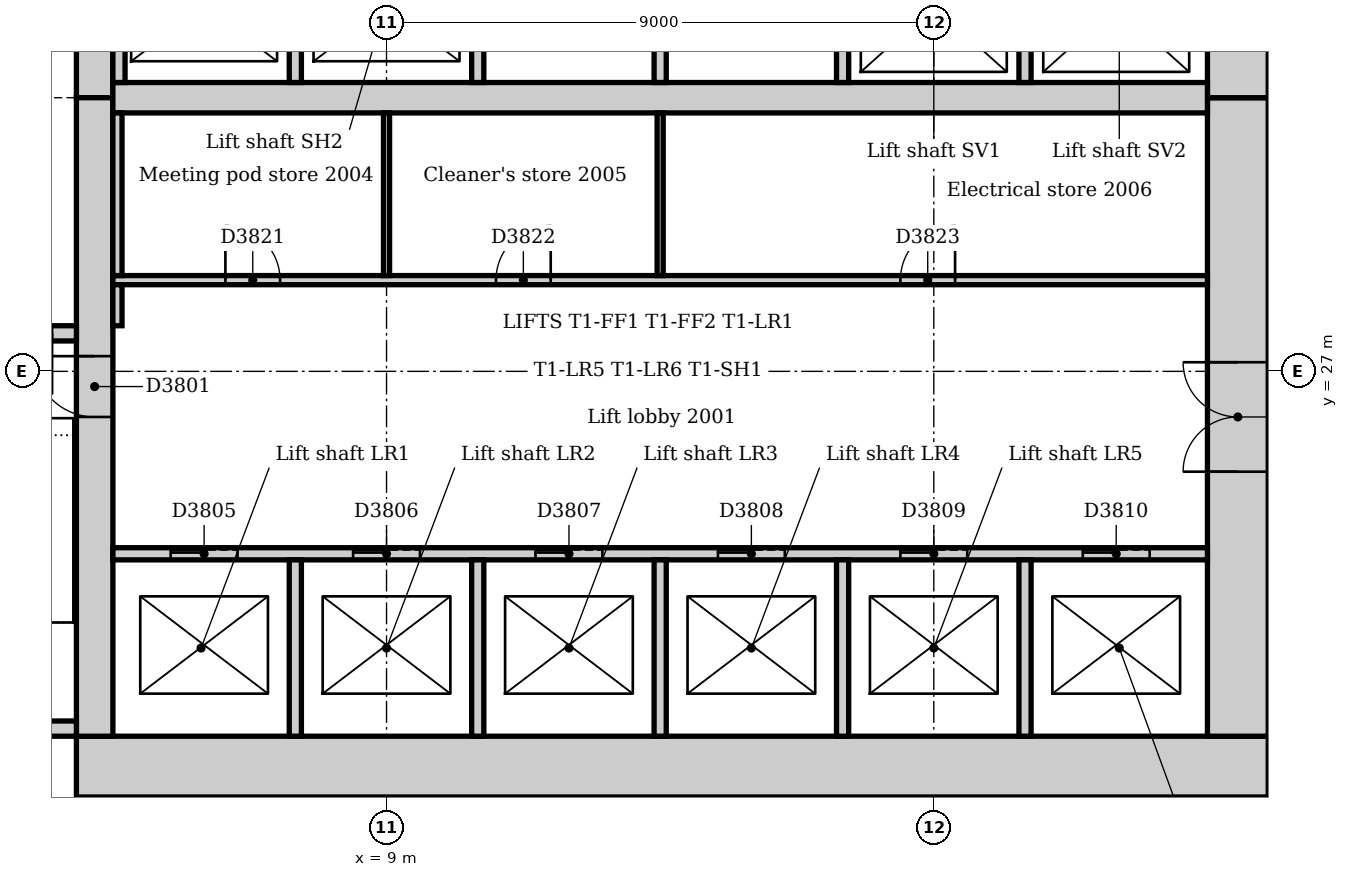
"""IFC4 building model, lengths in metres.
Left out: names, types, materials, properties, quantities, classifications, styles, units other than length and angle.
Written with IfcOpenShell. Run it as: python <this file> out.ifc"""

import sys

from ifc_helpers import new_model, si_unit, direction, frame, frame_2d, origin, place, context, subcontext, project, spatial, rectangle, extrude, element, fill, save


model = new_model("IFC4")
c1 = context("Model", 3, precision=1e-05, world=origin(), true_north=direction((0.0, 1.0)))
c2 = subcontext(c1, "Body", "Model", "MODEL_VIEW")
j1 = project(units=[si_unit("LENGTHUNIT", "METRE"), si_unit("PLANEANGLEUNIT", "RADIAN")], contexts=[c1])
p1 = place(None, origin())
s1 = spatial("IfcSite", under=j1, at=p1, CompositionType="ELEMENT")
p2 = place(p1, origin())
s2 = spatial("IfcBuilding", under=s1, at=p2, CompositionType="ELEMENT")
p3 = place(p2, frame((0.0, 0.0, 87.0)))
s3 = spatial("IfcBuildingStorey", under=s2, at=p3, CompositionType="ELEMENT", Elevation=87.0)
p4 = place(p3, frame((3.9, 20.5, 0.0), z_axis=(0.0, 0.0, 1.0), x_axis=(1.0, 0.0, 0.0)))
e1 = element("IfcWall", 1, at=p4, inside=s3, PredefinedType="SOLIDWALL", context=c2, shape_type="SweptSolid", body=[
    extrude(rectangle(XDim=19.6, YDim=1.0, at=frame_2d((9.8, 0.0))), origin(), (0.0, 0.0, 1.0), 4.0),
])
p5 = place(p3, frame((23.0, 21.0, 0.0), z_axis=(0.0, 0.0, 1.0), x_axis=(0.0, 1.0, 0.0)))
e2 = element("IfcWall", 2, at=p5, inside=s3, PredefinedType="SOLIDWALL", context=c2, shape_type="SweptSolid", body=[
    extrude(rectangle(XDim=10.5, YDim=1.0, at=frame_2d((5.25, 0.0))), origin(), (0.0, 0.0, 1.0), 4.0),
])
p6 = place(p5, frame((4.35, 0.0, 0.0)))
e3 = element("IfcOpeningElement", 3, at=p6, cuts=e2, PredefinedType="OPENING", context=c2, shape_type="SweptSolid", body=[
    extrude(rectangle(XDim=1.8, YDim=2.1, at=frame_2d((0.9, 1.05))), frame((0.0, 0.51, 0.0), z_axis=(0.0, -1.0, 0.0), x_axis=(1.0, 0.0, 0.0)), (0.0, 0.0, 1.0), 1.02),
])
p7 = place(p3, frame((23.0, 31.5, 0.0), z_axis=(0.0, 0.0, 1.0), x_axis=(0.0, 1.0, 0.0)))
e4 = element("IfcWall", 4, at=p7, inside=s3, PredefinedType="SOLIDWALL", context=c2, shape_type="SweptSolid", body=[
    extrude(rectangle(XDim=10.5, YDim=1.0, at=frame_2d((5.25, 0.0))), origin(), (0.0, 0.0, 1.0), 4.0),
])
p8 = place(p7, frame((3.15, 0.0, 0.0)))
e5 = element("IfcOpeningElement", 5, at=p8, cuts=e4, PredefinedType="OPENING", context=c2, shape_type="SweptSolid", body=[
    extrude(rectangle(XDim=1.0, YDim=2.1, at=frame_2d((0.5, 1.05))), frame((0.0, 0.51, 0.0), z_axis=(0.0, -1.0, 0.0), x_axis=(1.0, 0.0, 0.0)), (0.0, 0.0, 1.0), 1.02),
])
p9 = place(p7, frame((5.2, 0.0, 0.0)))
e6 = element("IfcOpeningElement", 6, at=p9, cuts=e4, PredefinedType="OPENING", context=c2, shape_type="SweptSolid", body=[
    extrude(rectangle(XDim=1.0, YDim=2.1, at=frame_2d((0.5, 1.05))), frame((0.0, 0.51, 0.0), z_axis=(0.0, -1.0, 0.0), x_axis=(1.0, 0.0, 0.0)), (0.0, 0.0, 1.0), 1.02),
])
p10 = place(p3, frame((4.2, 42.0, 0.0), z_axis=(0.0, 0.0, 1.0), x_axis=(0.0, -1.0, 0.0)))
e7 = element("IfcWall", 7, at=p10, inside=s3, PredefinedType="SOLIDWALL", context=c2, shape_type="SweptSolid", body=[
    extrude(rectangle(XDim=10.5, YDim=0.6, at=frame_2d((5.25, 0.0))), origin(), (0.0, 0.0, 1.0), 4.0),
])
p11 = place(p10, frame((5.3, 0.0, 0.0)))
e8 = element("IfcOpeningElement", 8, at=p11, cuts=e7, PredefinedType="OPENING", context=c2, shape_type="SweptSolid", body=[
    extrude(rectangle(XDim=1.0, YDim=2.1, at=frame_2d((0.5, 1.05))), frame((0.0, 0.31, 0.0), z_axis=(0.0, -1.0, 0.0), x_axis=(1.0, 0.0, 0.0)), (0.0, 0.0, 1.0), 0.62),
])
p12 = place(p3, frame((4.2, 31.5, 0.0), z_axis=(0.0, 0.0, 1.0), x_axis=(0.0, -1.0, 0.0)))
e9 = element("IfcWall", 9, at=p12, inside=s3, PredefinedType="SOLIDWALL", context=c2, shape_type="SweptSolid", body=[
    extrude(rectangle(XDim=10.5, YDim=0.6, at=frame_2d((5.25, 0.0))), origin(), (0.0, 0.0, 1.0), 4.0),
])
p13 = place(p12, frame((4.25, 0.0, 0.0)))
e10 = element("IfcOpeningElement", 10, at=p13, cuts=e9, PredefinedType="OPENING", context=c2, shape_type="SweptSolid", body=[
    extrude(rectangle(XDim=1.0, YDim=2.1, at=frame_2d((0.5, 1.05))), frame((0.0, 0.31, 0.0), z_axis=(0.0, -1.0, 0.0), x_axis=(1.0, 0.0, 0.0)), (0.0, 0.0, 1.0), 0.62),
])
p14 = place(p3, frame((4.5, 31.5, 0.0), z_axis=(0.0, 0.0, 1.0), x_axis=(1.0, 0.0, 0.0)))
e11 = element("IfcWall", 11, at=p14, inside=s3, PredefinedType="SOLIDWALL", context=c2, shape_type="SweptSolid", body=[
    extrude(rectangle(XDim=18.0, YDim=0.5, at=frame_2d((9.0, 0.0))), origin(), (0.0, 0.0, 1.0), 4.0),
])
p15 = place(p3, frame((0.36, 21.125, 0.0), z_axis=(0.0, 0.0, 1.0), x_axis=(1.0, 0.0, 0.0)))
e12 = element("IfcWall", 12, at=p15, inside=s3, PredefinedType="SOLIDWALL", context=c2, shape_type="SweptSolid", body=[
    extrude(rectangle(XDim=3.54, YDim=0.25, at=frame_2d((1.77, 0.0))), origin(), (0.0, 0.0, 1.0), 4.0),
])
p16 = place(p3, frame((3.9, 27.625, 0.0), z_axis=(0.0, 0.0, 1.0), x_axis=(-1.0, 0.0, 0.0)))
e13 = element("IfcWall", 13, at=p16, inside=s3, PredefinedType="SOLIDWALL", context=c2, shape_type="SweptSolid", body=[
    extrude(rectangle(XDim=3.54, YDim=0.25, at=frame_2d((1.77, 0.0))), origin(), (0.0, 0.0, 1.0), 4.0),
])
p17 = place(p16, frame((0.4, 0.0, 0.0)))
e14 = element("IfcOpeningElement", 14, at=p17, cuts=e13, PredefinedType="OPENING", context=c2, shape_type="SweptSolid", body=[
    extrude(rectangle(XDim=1.0, YDim=2.1, at=frame_2d((0.5, 1.05))), frame((0.0, 0.135, 0.0), z_axis=(0.0, -1.0, 0.0), x_axis=(1.0, 0.0, 0.0)), (0.0, 0.0, 1.0), 0.27),
])
p18 = place(p3, frame((4.5, 24.0, 0.0), z_axis=(0.0, 0.0, 1.0), x_axis=(1.0, 0.0, 0.0)))
e15 = element("IfcWall", 15, at=p18, inside=s3, PredefinedType="PARTITIONING", context=c2, shape_type="SweptSolid", body=[
    extrude(rectangle(XDim=18.0, YDim=0.2, at=frame_2d((9.0, 0.0))), origin(), (0.0, 0.0, 1.0), 3.85),
])
p19 = place(p18, frame((0.95, 0.0, 0.0)))
e16 = element("IfcOpeningElement", 16, at=p19, cuts=e15, PredefinedType="OPENING", context=c2, shape_type="SweptSolid", body=[
    extrude(rectangle(XDim=1.1, YDim=2.1, at=frame_2d((0.55, 1.05))), frame((0.0, 0.11, 0.0), z_axis=(0.0, -1.0, 0.0), x_axis=(1.0, 0.0, 0.0)), (0.0, 0.0, 1.0), 0.22),
])
p20 = place(p18, frame((3.95, 0.0, 0.0)))
e17 = element("IfcOpeningElement", 17, at=p20, cuts=e15, PredefinedType="OPENING", context=c2, shape_type="SweptSolid", body=[
    extrude(rectangle(XDim=1.1, YDim=2.1, at=frame_2d((0.55, 1.05))), frame((0.0, 0.11, 0.0), z_axis=(0.0, -1.0, 0.0), x_axis=(1.0, 0.0, 0.0)), (0.0, 0.0, 1.0), 0.22),
])
p21 = place(p18, frame((6.95, 0.0, 0.0)))
e18 = element("IfcOpeningElement", 18, at=p21, cuts=e15, PredefinedType="OPENING", context=c2, shape_type="SweptSolid", body=[
    extrude(rectangle(XDim=1.1, YDim=2.1, at=frame_2d((0.55, 1.05))), frame((0.0, 0.11, 0.0), z_axis=(0.0, -1.0, 0.0), x_axis=(1.0, 0.0, 0.0)), (0.0, 0.0, 1.0), 0.22),
])
p22 = place(p18, frame((9.95, 0.0, 0.0)))
e19 = element("IfcOpeningElement", 19, at=p22, cuts=e15, PredefinedType="OPENING", context=c2, shape_type="SweptSolid", body=[
    extrude(rectangle(XDim=1.1, YDim=2.1, at=frame_2d((0.55, 1.05))), frame((0.0, 0.11, 0.0), z_axis=(0.0, -1.0, 0.0), x_axis=(1.0, 0.0, 0.0)), (0.0, 0.0, 1.0), 0.22),
])
p23 = place(p18, frame((12.95, 0.0, 0.0)))
e20 = element("IfcOpeningElement", 20, at=p23, cuts=e15, PredefinedType="OPENING", context=c2, shape_type="SweptSolid", body=[
    extrude(rectangle(XDim=1.1, YDim=2.1, at=frame_2d((0.55, 1.05))), frame((0.0, 0.11, 0.0), z_axis=(0.0, -1.0, 0.0), x_axis=(1.0, 0.0, 0.0)), (0.0, 0.0, 1.0), 0.22),
])
p24 = place(p18, frame((15.95, 0.0, 0.0)))
e21 = element("IfcOpeningElement", 21, at=p24, cuts=e15, PredefinedType="OPENING", context=c2, shape_type="SweptSolid", body=[
    extrude(rectangle(XDim=1.1, YDim=2.1, at=frame_2d((0.55, 1.05))), frame((0.0, 0.11, 0.0), z_axis=(0.0, -1.0, 0.0), x_axis=(1.0, 0.0, 0.0)), (0.0, 0.0, 1.0), 0.22),
])
p25 = place(p3, frame((4.6, 31.75, 0.0), z_axis=(0.0, 0.0, 1.0), x_axis=(0.0, 1.0, 0.0)))
e22 = element("IfcWall", 22, at=p25, inside=s3, PredefinedType="PARTITIONING", context=c2, shape_type="SweptSolid", body=[
    extrude(rectangle(XDim=2.65, YDim=0.2, at=frame_2d((1.325, 0.0))), origin(), (0.0, 0.0, 1.0), 3.85),
])
p26 = place(p3, frame((7.5, 21.0, 0.0), z_axis=(0.0, 0.0, 1.0), x_axis=(0.0, 1.0, 0.0)))
e23 = element("IfcWall", 23, at=p26, inside=s3, PredefinedType="PARTITIONING", context=c2, shape_type="SweptSolid", body=[
    extrude(rectangle(XDim=2.9, YDim=0.2, at=frame_2d((1.45, 0.0))), origin(), (0.0, 0.0, 1.0), 3.85),
])
p27 = place(p3, frame((7.5, 31.75, 0.0), z_axis=(0.0, 0.0, 1.0), x_axis=(0.0, 1.0, 0.0)))
e24 = element("IfcWall", 24, at=p27, inside=s3, PredefinedType="PARTITIONING", context=c2, shape_type="SweptSolid", body=[
    extrude(rectangle(XDim=2.65, YDim=0.2, at=frame_2d((1.325, 0.0))), origin(), (0.0, 0.0, 1.0), 3.85),
])
p28 = place(p3, frame((10.5, 21.0, 0.0), z_axis=(0.0, 0.0, 1.0), x_axis=(0.0, 1.0, 0.0)))
e25 = element("IfcWall", 25, at=p28, inside=s3, PredefinedType="PARTITIONING", context=c2, shape_type="SweptSolid", body=[
    extrude(rectangle(XDim=2.9, YDim=0.2, at=frame_2d((1.45, 0.0))), origin(), (0.0, 0.0, 1.0), 3.85),
])
p29 = place(p3, frame((10.5, 31.75, 0.0), z_axis=(0.0, 0.0, 1.0), x_axis=(0.0, 1.0, 0.0)))
e26 = element("IfcWall", 26, at=p29, inside=s3, PredefinedType="PARTITIONING", context=c2, shape_type="SweptSolid", body=[
    extrude(rectangle(XDim=2.65, YDim=0.2, at=frame_2d((1.325, 0.0))), origin(), (0.0, 0.0, 1.0), 3.85),
])
p30 = place(p3, frame((13.5, 21.0, 0.0), z_axis=(0.0, 0.0, 1.0), x_axis=(0.0, 1.0, 0.0)))
e27 = element("IfcWall", 27, at=p30, inside=s3, PredefinedType="PARTITIONING", context=c2, shape_type="SweptSolid", body=[
    extrude(rectangle(XDim=2.9, YDim=0.2, at=frame_2d((1.45, 0.0))), origin(), (0.0, 0.0, 1.0), 3.85),
])
p31 = place(p3, frame((13.5, 31.75, 0.0), z_axis=(0.0, 0.0, 1.0), x_axis=(0.0, 1.0, 0.0)))
e28 = element("IfcWall", 28, at=p31, inside=s3, PredefinedType="PARTITIONING", context=c2, shape_type="SweptSolid", body=[
    extrude(rectangle(XDim=2.65, YDim=0.2, at=frame_2d((1.325, 0.0))), origin(), (0.0, 0.0, 1.0), 3.85),
])
p32 = place(p3, frame((16.5, 21.0, 0.0), z_axis=(0.0, 0.0, 1.0), x_axis=(0.0, 1.0, 0.0)))
e29 = element("IfcWall", 29, at=p32, inside=s3, PredefinedType="PARTITIONING", context=c2, shape_type="SweptSolid", body=[
    extrude(rectangle(XDim=2.9, YDim=0.2, at=frame_2d((1.45, 0.0))), origin(), (0.0, 0.0, 1.0), 3.85),
])
p33 = place(p3, frame((16.5, 31.75, 0.0), z_axis=(0.0, 0.0, 1.0), x_axis=(0.0, 1.0, 0.0)))
e30 = element("IfcWall", 30, at=p33, inside=s3, PredefinedType="PARTITIONING", context=c2, shape_type="SweptSolid", body=[
    extrude(rectangle(XDim=2.65, YDim=0.2, at=frame_2d((1.325, 0.0))), origin(), (0.0, 0.0, 1.0), 3.85),
])
p34 = place(p3, frame((19.5, 21.0, 0.0), z_axis=(0.0, 0.0, 1.0), x_axis=(0.0, 1.0, 0.0)))
e31 = element("IfcWall", 31, at=p34, inside=s3, PredefinedType="PARTITIONING", context=c2, shape_type="SweptSolid", body=[
    extrude(rectangle(XDim=2.9, YDim=0.2, at=frame_2d((1.45, 0.0))), origin(), (0.0, 0.0, 1.0), 3.85),
])
p35 = place(p3, frame((19.5, 31.75, 0.0), z_axis=(0.0, 0.0, 1.0), x_axis=(0.0, 1.0, 0.0)))
e32 = element("IfcWall", 32, at=p35, inside=s3, PredefinedType="PARTITIONING", context=c2, shape_type="SweptSolid", body=[
    extrude(rectangle(XDim=2.65, YDim=0.2, at=frame_2d((1.325, 0.0))), origin(), (0.0, 0.0, 1.0), 3.85),
])
p36 = place(p3, frame((4.5, 28.5, 0.0), z_axis=(0.0, 0.0, 1.0), x_axis=(1.0, 0.0, 0.0)))
e33 = element("IfcWall", 33, at=p36, inside=s3, PredefinedType="PARTITIONING", context=c2, shape_type="SweptSolid", body=[
    extrude(rectangle(XDim=18.0, YDim=0.15, at=frame_2d((9.0, 0.0))), origin(), (0.0, 0.0, 1.0), 3.85),
])
p37 = place(p36, frame((1.85, 0.0, 0.0)))
e34 = element("IfcOpeningElement", 34, at=p37, cuts=e33, PredefinedType="OPENING", context=c2, shape_type="SweptSolid", body=[
    extrude(rectangle(XDim=0.9, YDim=2.1, at=frame_2d((0.45, 1.05))), frame((0.0, 0.085, 0.0), z_axis=(0.0, -1.0, 0.0), x_axis=(1.0, 0.0, 0.0)), (0.0, 0.0, 1.0), 0.17),
])
p38 = place(p36, frame((6.3, 0.0, 0.0)))
e35 = element("IfcOpeningElement", 35, at=p38, cuts=e33, PredefinedType="OPENING", context=c2, shape_type="SweptSolid", body=[
    extrude(rectangle(XDim=0.9, YDim=2.1, at=frame_2d((0.45, 1.05))), frame((0.0, 0.085, 0.0), z_axis=(0.0, -1.0, 0.0), x_axis=(1.0, 0.0, 0.0)), (0.0, 0.0, 1.0), 0.17),
])
p39 = place(p36, frame((12.95, 0.0, 0.0)))
e36 = element("IfcOpeningElement", 36, at=p39, cuts=e33, PredefinedType="OPENING", context=c2, shape_type="SweptSolid", body=[
    extrude(rectangle(XDim=0.9, YDim=2.1, at=frame_2d((0.45, 1.05))), frame((0.0, 0.085, 0.0), z_axis=(0.0, -1.0, 0.0), x_axis=(1.0, 0.0, 0.0)), (0.0, 0.0, 1.0), 0.17),
])
p40 = place(p3, frame((4.575, 27.75, 0.0), z_axis=(0.0, 0.0, 1.0), x_axis=(0.0, 1.0, 0.0)))
e37 = element("IfcWall", 37, at=p40, inside=s3, PredefinedType="PARTITIONING", context=c2, shape_type="SweptSolid", body=[
    extrude(rectangle(XDim=0.675, YDim=0.15, at=frame_2d((0.338, 0.0))), origin(), (0.0, 0.0, 1.0), 3.85),
])
p41 = place(p3, frame((4.575, 28.575, 0.0), z_axis=(0.0, 0.0, 1.0), x_axis=(0.0, 1.0, 0.0)))
e38 = element("IfcWall", 38, at=p41, inside=s3, PredefinedType="PARTITIONING", context=c2, shape_type="SweptSolid", body=[
    extrude(rectangle(XDim=2.675, YDim=0.15, at=frame_2d((1.337, 0.0))), origin(), (0.0, 0.0, 1.0), 3.85),
])
for number, where, z_axis, x_axis in (
    (39, (9.0, 28.575, 0.0), (0.0, 0.0, 1.0), (0.0, 1.0, 0.0)),
    (40, (13.5, 28.575, 0.0), (0.0, 0.0, 1.0), (0.0, 1.0, 0.0)),
):
    element("IfcWall", number, at=place(p3, frame(where, z_axis=z_axis, x_axis=x_axis)), inside=s3, PredefinedType="PARTITIONING", context=c2, shape_type="SweptSolid", body=[
        extrude(rectangle(XDim=2.675, YDim=0.1, at=frame_2d((1.337, 0.0))), origin(), (0.0, 0.0, 1.0), 3.85),
    ])
p42 = place(p13, frame((1.0, 0.0, 0.0), z_axis=(0.0, 0.0, 1.0), x_axis=(-1.0, 0.0, 0.0)))
e41 = element("IfcDoor", 41, at=p42, inside=s3, OperationType="SINGLE_SWING_RIGHT", PredefinedType="DOOR", context=c2, shape_type="SweptSolid", body=[
    extrude(rectangle(XDim=1.0, YDim=2.1, at=frame_2d((0.5, 1.05))), frame((0.0, 0.025, 0.0), z_axis=(0.0, -1.0, 0.0), x_axis=(1.0, 0.0, 0.0)), (0.0, 0.0, 1.0), 0.05),
])
fill(e10, e41)
p43 = place(p19, origin())
e42 = element("IfcDoor", 42, at=p43, inside=s3, OperationType="SLIDING_TO_LEFT", PredefinedType="DOOR", context=c2, shape_type="SweptSolid", body=[
    extrude(rectangle(XDim=1.1, YDim=2.1, at=frame_2d((0.55, 1.05))), frame((0.0, 0.025, 0.0), z_axis=(0.0, -1.0, 0.0), x_axis=(1.0, 0.0, 0.0)), (0.0, 0.0, 1.0), 0.05),
])
fill(e16, e42)
p44 = place(p20, origin())
e43 = element("IfcDoor", 43, at=p44, inside=s3, OperationType="SLIDING_TO_LEFT", PredefinedType="DOOR", context=c2, shape_type="SweptSolid", body=[
    extrude(rectangle(XDim=1.1, YDim=2.1, at=frame_2d((0.55, 1.05))), frame((0.0, 0.025, 0.0), z_axis=(0.0, -1.0, 0.0), x_axis=(1.0, 0.0, 0.0)), (0.0, 0.0, 1.0), 0.05),
])
fill(e17, e43)
p45 = place(p21, origin())
e44 = element("IfcDoor", 44, at=p45, inside=s3, OperationType="SLIDING_TO_LEFT", PredefinedType="DOOR", context=c2, shape_type="SweptSolid", body=[
    extrude(rectangle(XDim=1.1, YDim=2.1, at=frame_2d((0.55, 1.05))), frame((0.0, 0.025, 0.0), z_axis=(0.0, -1.0, 0.0), x_axis=(1.0, 0.0, 0.0)), (0.0, 0.0, 1.0), 0.05),
])
fill(e18, e44)
p46 = place(p22, origin())
e45 = element("IfcDoor", 45, at=p46, inside=s3, OperationType="SLIDING_TO_LEFT", PredefinedType="DOOR", context=c2, shape_type="SweptSolid", body=[
    extrude(rectangle(XDim=1.1, YDim=2.1, at=frame_2d((0.55, 1.05))), frame((0.0, 0.025, 0.0), z_axis=(0.0, -1.0, 0.0), x_axis=(1.0, 0.0, 0.0)), (0.0, 0.0, 1.0), 0.05),
])
fill(e19, e45)
p47 = place(p23, origin())
e46 = element("IfcDoor", 46, at=p47, inside=s3, OperationType="SLIDING_TO_LEFT", PredefinedType="DOOR", context=c2, shape_type="SweptSolid", body=[
    extrude(rectangle(XDim=1.1, YDim=2.1, at=frame_2d((0.55, 1.05))), frame((0.0, 0.025, 0.0), z_axis=(0.0, -1.0, 0.0), x_axis=(1.0, 0.0, 0.0)), (0.0, 0.0, 1.0), 0.05),
])
fill(e20, e46)
p48 = place(p24, origin())
e47 = element("IfcDoor", 47, at=p48, inside=s3, OperationType="SLIDING_TO_LEFT", PredefinedType="DOOR", context=c2, shape_type="SweptSolid", body=[
    extrude(rectangle(XDim=1.1, YDim=2.1, at=frame_2d((0.55, 1.05))), frame((0.0, 0.025, 0.0), z_axis=(0.0, -1.0, 0.0), x_axis=(1.0, 0.0, 0.0)), (0.0, 0.0, 1.0), 0.05),
])
fill(e21, e47)
p49 = place(p6, origin())
e48 = element("IfcDoor", 48, at=p49, inside=s3, OperationType="DOUBLE_DOOR_DOUBLE_SWING", PredefinedType="DOOR", context=c2, shape_type="SweptSolid", body=[
    extrude(rectangle(XDim=1.8, YDim=2.1, at=frame_2d((0.9, 1.05))), frame((0.0, 0.025, 0.0), z_axis=(0.0, -1.0, 0.0), x_axis=(1.0, 0.0, 0.0)), (0.0, 0.0, 1.0), 0.05),
])
fill(e3, e48)
p50 = place(p37, origin())
e49 = element("IfcDoor", 49, at=p50, inside=s3, OperationType="SINGLE_SWING_LEFT", PredefinedType="DOOR", context=c2, shape_type="SweptSolid", body=[
    extrude(rectangle(XDim=0.9, YDim=2.1, at=frame_2d((0.45, 1.05))), frame((0.0, 0.025, 0.0), z_axis=(0.0, -1.0, 0.0), x_axis=(1.0, 0.0, 0.0)), (0.0, 0.0, 1.0), 0.05),
])
fill(e34, e49)
p51 = place(p38, origin())
e50 = element("IfcDoor", 50, at=p51, inside=s3, OperationType="SINGLE_SWING_RIGHT", PredefinedType="DOOR", context=c2, shape_type="SweptSolid", body=[
    extrude(rectangle(XDim=0.9, YDim=2.1, at=frame_2d((0.45, 1.05))), frame((0.0, 0.025, 0.0), z_axis=(0.0, -1.0, 0.0), x_axis=(1.0, 0.0, 0.0)), (0.0, 0.0, 1.0), 0.05),
])
fill(e35, e50)
p52 = place(p39, origin())
e51 = element("IfcDoor", 51, at=p52, inside=s3, OperationType="SINGLE_SWING_RIGHT", PredefinedType="DOOR", context=c2, shape_type="SweptSolid", body=[
    extrude(rectangle(XDim=0.9, YDim=2.1, at=frame_2d((0.45, 1.05))), frame((0.0, 0.025, 0.0), z_axis=(0.0, -1.0, 0.0), x_axis=(1.0, 0.0, 0.0)), (0.0, 0.0, 1.0), 0.05),
])
fill(e36, e51)
save(model, sys.argv[1])
